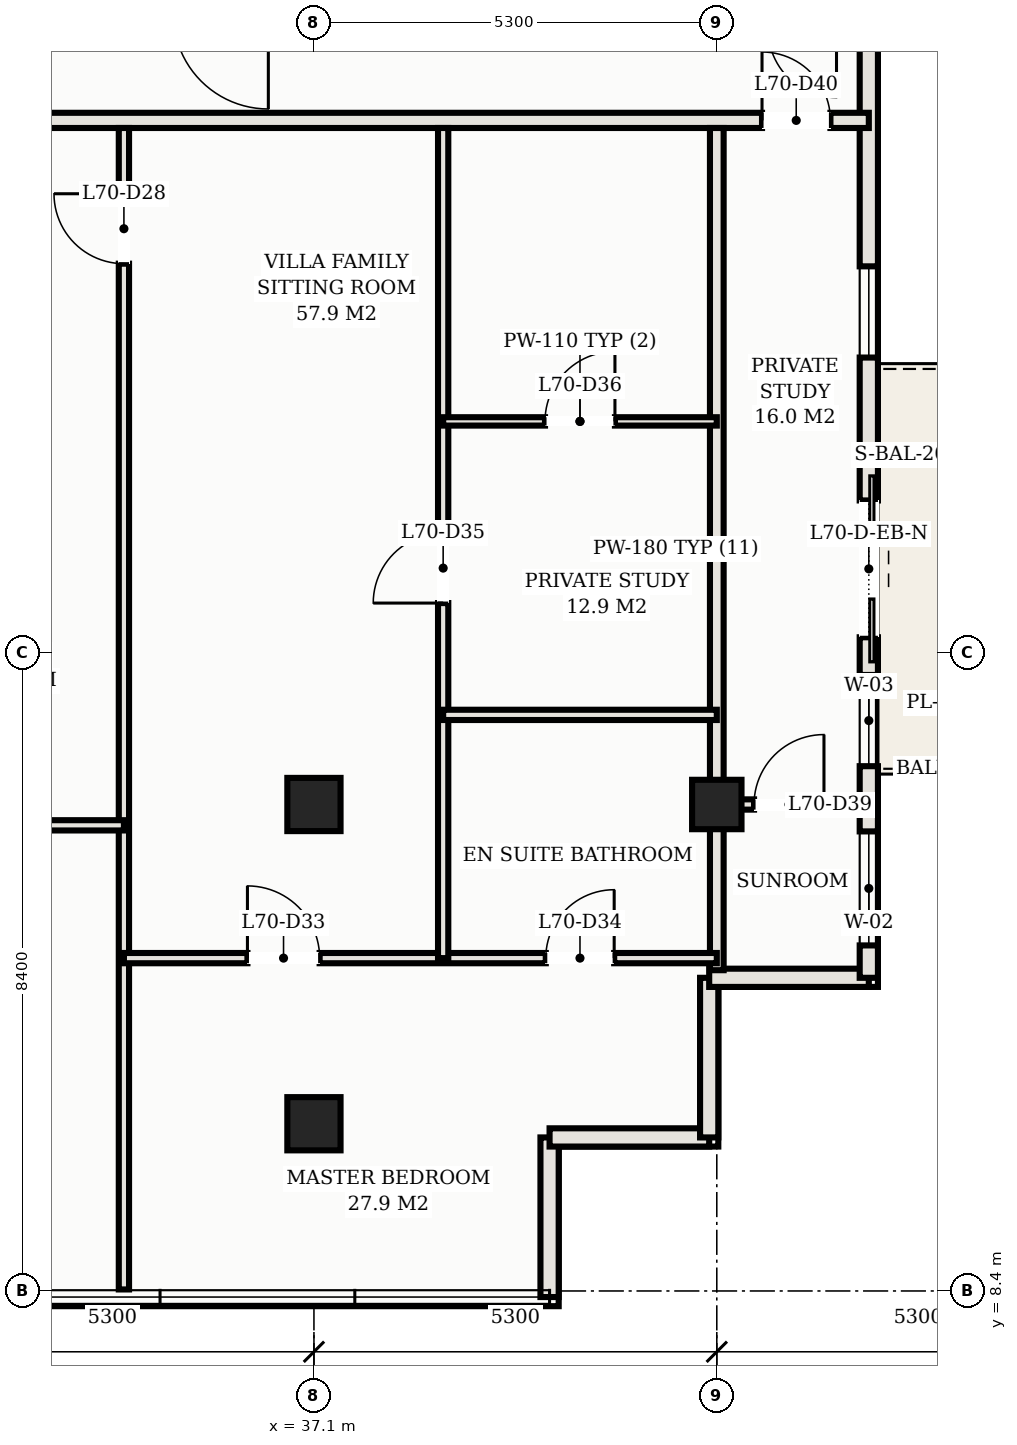
"""IFC4 building model, lengths in metres.
Left out: names, types, materials, properties, quantities, classifications, styles, units other than length and angle.
Written with IfcOpenShell. Run it as: python <this file> out.ifc"""

import sys

from ifc_helpers import new_model, si_unit, direction, frame, frame_2d, origin, origin_2d, place, context, subcontext, project, spatial, rectangle, hollow_rectangle, extrude, element, fill, save


model = new_model("IFC4")
c1 = context("Model", 3, precision=1e-05, world=origin(), true_north=direction((0.0, 1.0)))
c2 = subcontext(c1, "Body", "Model", "MODEL_VIEW")
j1 = project(units=[si_unit("LENGTHUNIT", "METRE"), si_unit("PLANEANGLEUNIT", "RADIAN")], contexts=[c1])
p1 = place(None, origin())
s1 = spatial("IfcSite", under=j1, at=p1, CompositionType="ELEMENT")
p2 = place(p1, origin())
s2 = spatial("IfcBuilding", under=s1, at=p2, CompositionType="ELEMENT")
p3 = place(p2, frame((0.0, 0.0, 252.8)))
s3 = spatial("IfcBuildingStorey", under=s2, at=p3, CompositionType="ELEMENT", Elevation=252.8)
for number, where, z_axis, x_axis in (
    (1, (37.1, 14.8, 0.0), (0.0, 0.0, 1.0), (1.0, 0.0, 0.0)),
    (2, (37.1, 10.6, 0.0), (0.0, 0.0, 1.0), (1.0, 0.0, 0.0)),
):
    element("IfcColumn", number, at=place(p3, frame(where, z_axis=z_axis, x_axis=x_axis)), inside=s3, PredefinedType="COLUMN", context=c2, shape_type="SweptSolid", body=[
        extrude(hollow_rectangle(XDim=0.7, YDim=0.7, WallThickness=0.025, at=origin_2d()), origin(), (0.0, 0.0, 1.0), 3.3),
    ])
p4 = place(p3, frame((42.4, 14.8, 0.0), z_axis=(0.0, 0.0, 1.0), x_axis=(1.0, 0.0, 0.0)))
e3 = element("IfcColumn", 3, at=p4, inside=s3, PredefinedType="COLUMN", context=c2, shape_type="SweptSolid", body=[
    extrude(hollow_rectangle(XDim=0.65, YDim=0.65, WallThickness=0.022, at=origin_2d()), origin(), (0.0, 0.0, 1.0), 3.3),
])
p5 = place(p3, frame((40.2, 8.32, 0.0), z_axis=(0.0, 0.0, 1.0), x_axis=(0.0, 1.0, 0.0)))
e4 = element("IfcWall", 4, at=p5, inside=s3, PredefinedType="SOLIDWALL", context=c2, shape_type="SweptSolid", body=[
    extrude(rectangle(XDim=2.1, YDim=0.24, at=frame_2d((1.05, 0.0))), origin(), (0.0, 0.0, 1.0), 3.11),
])
for number, where, z_axis, x_axis in (
    (5, (40.2, 10.42, 0.0), (0.0, 0.0, 1.0), (1.0, 0.0, 0.0)),
    (6, (42.3, 10.42, 0.0), (0.0, 0.0, 1.0), (0.0, 1.0, 0.0)),
):
    element("IfcWall", number, at=place(p3, frame(where, z_axis=z_axis, x_axis=x_axis)), inside=s3, PredefinedType="SOLIDWALL", context=c2, shape_type="SweptSolid", body=[
        extrude(rectangle(XDim=2.1, YDim=0.24, at=frame_2d((1.05, 0.0))), origin(), (0.0, 0.0, 1.0), 3.11),
    ])
p6 = place(p3, frame((42.3, 12.52, 0.0), z_axis=(0.0, 0.0, 1.0), x_axis=(1.0, 0.0, 0.0)))
e7 = element("IfcWall", 7, at=p6, inside=s3, PredefinedType="SOLIDWALL", context=c2, shape_type="SweptSolid", body=[
    extrude(rectangle(XDim=2.1, YDim=0.24, at=frame_2d((1.05, 0.0))), origin(), (0.0, 0.0, 1.0), 3.11),
])
p7 = place(p3, frame((44.4, 12.52, 0.0), z_axis=(0.0, 0.0, 1.0), x_axis=(0.0, 1.0, 0.0)))
e8 = element("IfcWall", 8, at=p7, inside=s3, PredefinedType="SOLIDWALL", context=c2, shape_type="SweptSolid", body=[
    extrude(rectangle(XDim=26.01, YDim=0.24, at=frame_2d((13.005, 0.0))), origin(), (0.0, 0.0, 1.0), 3.11),
])
p8 = place(p7, frame((4.48, 0.0, 0.0)))
e9 = element("IfcOpeningElement", 9, at=p8, cuts=e8, PredefinedType="OPENING", context=c2, shape_type="SweptSolid", body=[
    extrude(rectangle(XDim=1.8, YDim=2.2, at=frame_2d((0.9, 1.1))), frame((0.0, 0.13, 0.0), z_axis=(0.0, -1.0, 0.0), x_axis=(1.0, 0.0, 0.0)), (0.0, 0.0, 1.0), 0.26),
])
p9 = place(p7, frame((0.426, 0.0, 0.75)))
e10 = element("IfcOpeningElement", 10, at=p9, cuts=e8, PredefinedType="OPENING", context=c2, shape_type="SweptSolid", body=[
    extrude(rectangle(XDim=1.5, YDim=1.6, at=frame_2d((0.75, 0.8))), frame((0.0, 0.13, 0.0), z_axis=(0.0, -1.0, 0.0), x_axis=(1.0, 0.0, 0.0)), (0.0, 0.0, 1.0), 0.26),
])
p10 = place(p7, frame((2.784, 0.0, 0.75)))
e11 = element("IfcOpeningElement", 11, at=p10, cuts=e8, PredefinedType="OPENING", context=c2, shape_type="SweptSolid", body=[
    extrude(rectangle(XDim=1.2, YDim=1.5, at=frame_2d((0.6, 0.75))), frame((0.0, 0.13, 0.0), z_axis=(0.0, -1.0, 0.0), x_axis=(1.0, 0.0, 0.0)), (0.0, 0.0, 1.0), 0.26),
])
p11 = place(p7, frame((8.16, 0.0, 0.75)))
e12 = element("IfcOpeningElement", 12, at=p11, cuts=e8, PredefinedType="OPENING", context=c2, shape_type="SweptSolid", body=[
    extrude(rectangle(XDim=1.2, YDim=1.5, at=frame_2d((0.6, 0.75))), frame((0.0, 0.13, 0.0), z_axis=(0.0, -1.0, 0.0), x_axis=(1.0, 0.0, 0.0)), (0.0, 0.0, 1.0), 0.26),
])
p12 = place(p7, frame((16.296, 0.0, 0.75)))
e13 = element("IfcOpeningElement", 13, at=p12, cuts=e8, PredefinedType="OPENING", context=c2, shape_type="SweptSolid", body=[
    extrude(rectangle(XDim=1.2, YDim=1.5, at=frame_2d((0.6, 0.75))), frame((0.0, 0.13, 0.0), z_axis=(0.0, -1.0, 0.0), x_axis=(1.0, 0.0, 0.0)), (0.0, 0.0, 1.0), 0.26),
])
p13 = place(p7, frame((23.009, 0.0, 0.75)))
e14 = element("IfcOpeningElement", 14, at=p13, cuts=e8, PredefinedType="OPENING", context=c2, shape_type="SweptSolid", body=[
    extrude(rectangle(XDim=1.2, YDim=1.5, at=frame_2d((0.6, 0.75))), frame((0.0, 0.13, 0.0), z_axis=(0.0, -1.0, 0.0), x_axis=(1.0, 0.0, 0.0)), (0.0, 0.0, 1.0), 0.26),
])
p14 = place(p3, frame((8.6, 23.8, 0.0), z_axis=(0.0, 0.0, 1.0), x_axis=(1.0, 0.0, 0.0)))
e15 = element("IfcWall", 15, at=p14, inside=s3, PredefinedType="PARTITIONING", context=c2, shape_type="SweptSolid", body=[
    extrude(rectangle(XDim=35.8, YDim=0.2, at=frame_2d((17.9, 0.0))), origin(), (0.0, 0.0, 1.0), 2.45),
])
p15 = place(p14, frame((2.75, 0.0, 0.0)))
e16 = element("IfcOpeningElement", 16, at=p15, cuts=e15, PredefinedType="OPENING", context=c2, shape_type="SweptSolid", body=[
    extrude(rectangle(XDim=1.1, YDim=2.25, at=frame_2d((0.55, 1.125))), frame((0.0, 0.11, 0.0), z_axis=(0.0, -1.0, 0.0), x_axis=(1.0, 0.0, 0.0)), (0.0, 0.0, 1.0), 0.22),
])
p16 = place(p14, frame((18.85, 0.0, 0.0)))
e17 = element("IfcOpeningElement", 17, at=p16, cuts=e15, PredefinedType="OPENING", context=c2, shape_type="SweptSolid", body=[
    extrude(rectangle(XDim=1.1, YDim=2.25, at=frame_2d((0.55, 1.125))), frame((0.0, 0.11, 0.0), z_axis=(0.0, -1.0, 0.0), x_axis=(1.0, 0.0, 0.0)), (0.0, 0.0, 1.0), 0.22),
])
p17 = place(p14, frame((0.505, 0.0, 0.0)))
e18 = element("IfcOpeningElement", 18, at=p17, cuts=e15, PredefinedType="OPENING", context=c2, shape_type="SweptSolid", body=[
    extrude(rectangle(XDim=0.9, YDim=2.15, at=frame_2d((0.45, 1.075))), frame((0.0, 0.11, 0.0), z_axis=(0.0, -1.0, 0.0), x_axis=(1.0, 0.0, 0.0)), (0.0, 0.0, 1.0), 0.22),
])
p18 = place(p14, frame((34.395, 0.0, 0.0)))
e19 = element("IfcOpeningElement", 19, at=p18, cuts=e15, PredefinedType="OPENING", context=c2, shape_type="SweptSolid", body=[
    extrude(rectangle(XDim=0.9, YDim=2.15, at=frame_2d((0.45, 1.075))), frame((0.0, 0.11, 0.0), z_axis=(0.0, -1.0, 0.0), x_axis=(1.0, 0.0, 0.0)), (0.0, 0.0, 1.0), 0.22),
])
p19 = place(p3, frame((42.4, 12.62, 0.0), z_axis=(0.0, 0.0, 1.0), x_axis=(0.0, 1.0, 0.0)))
e20 = element("IfcWall", 20, at=p19, inside=s3, PredefinedType="PARTITIONING", context=c2, shape_type="SweptSolid", body=[
    extrude(rectangle(XDim=11.08, YDim=0.18, at=frame_2d((5.54, 0.0))), origin(), (0.0, 0.0, 1.0), 2.45),
])
p20 = place(p3, frame((34.6, 8.42, 0.0), z_axis=(0.0, 0.0, 1.0), x_axis=(0.0, 1.0, 0.0)))
e21 = element("IfcWall", 21, at=p20, inside=s3, PredefinedType="PARTITIONING", context=c2, shape_type="SweptSolid", body=[
    extrude(rectangle(XDim=15.28, YDim=0.135, at=frame_2d((7.64, 0.0))), origin(), (0.0, 0.0, 1.0), 2.45),
])
p21 = place(p20, frame((13.495, 0.0, 0.0)))
e22 = element("IfcOpeningElement", 22, at=p21, cuts=e21, PredefinedType="OPENING", context=c2, shape_type="SweptSolid", body=[
    extrude(rectangle(XDim=0.92, YDim=2.15, at=frame_2d((0.46, 1.075))), frame((0.0, 0.078, 0.0), z_axis=(0.0, -1.0, 0.0), x_axis=(1.0, 0.0, 0.0)), (0.0, 0.0, 1.0), 0.155),
])
p22 = place(p3, frame((26.5, 14.526, 0.0), z_axis=(0.0, 0.0, 1.0), x_axis=(1.0, 0.0, 0.0)))
e23 = element("IfcWall", 23, at=p22, inside=s3, PredefinedType="PARTITIONING", context=c2, shape_type="SweptSolid", body=[
    extrude(rectangle(XDim=8.1, YDim=0.135, at=frame_2d((4.05, 0.0))), origin(), (0.0, 0.0, 1.0), 2.45),
])
p23 = place(p22, frame((0.815, 0.0, 0.0)))
e24 = element("IfcOpeningElement", 24, at=p23, cuts=e23, PredefinedType="OPENING", context=c2, shape_type="SweptSolid", body=[
    extrude(rectangle(XDim=0.92, YDim=2.15, at=frame_2d((0.46, 1.075))), frame((0.0, 0.078, 0.0), z_axis=(0.0, -1.0, 0.0), x_axis=(1.0, 0.0, 0.0)), (0.0, 0.0, 1.0), 0.155),
])
p24 = place(p3, frame((34.6, 12.779, 0.0), z_axis=(0.0, 0.0, 1.0), x_axis=(1.0, 0.0, 0.0)))
e25 = element("IfcWall", 25, at=p24, inside=s3, PredefinedType="PARTITIONING", context=c2, shape_type="SweptSolid", body=[
    extrude(rectangle(XDim=7.8, YDim=0.135, at=frame_2d((3.9, 0.0))), origin(), (0.0, 0.0, 1.0), 2.45),
])
p25 = place(p24, frame((1.625, 0.0, 0.0)))
e26 = element("IfcOpeningElement", 26, at=p25, cuts=e25, PredefinedType="OPENING", context=c2, shape_type="SweptSolid", body=[
    extrude(rectangle(XDim=0.95, YDim=2.15, at=frame_2d((0.475, 1.075))), frame((0.0, 0.078, 0.0), z_axis=(0.0, -1.0, 0.0), x_axis=(1.0, 0.0, 0.0)), (0.0, 0.0, 1.0), 0.155),
])
p26 = place(p24, frame((5.55, 0.0, 0.0)))
e27 = element("IfcOpeningElement", 27, at=p26, cuts=e25, PredefinedType="OPENING", context=c2, shape_type="SweptSolid", body=[
    extrude(rectangle(XDim=0.9, YDim=2.15, at=frame_2d((0.45, 1.075))), frame((0.0, 0.078, 0.0), z_axis=(0.0, -1.0, 0.0), x_axis=(1.0, 0.0, 0.0)), (0.0, 0.0, 1.0), 0.155),
])
p27 = place(p3, frame((38.8, 12.779, 0.0), z_axis=(0.0, 0.0, 1.0), x_axis=(0.0, 1.0, 0.0)))
e28 = element("IfcWall", 28, at=p27, inside=s3, PredefinedType="PARTITIONING", context=c2, shape_type="SweptSolid", body=[
    extrude(rectangle(XDim=10.921, YDim=0.135, at=frame_2d((5.46, 0.0))), origin(), (0.0, 0.0, 1.0), 2.45),
])
p28 = place(p27, frame((4.671, 0.0, 0.0)))
e29 = element("IfcOpeningElement", 29, at=p28, cuts=e28, PredefinedType="OPENING", context=c2, shape_type="SweptSolid", body=[
    extrude(rectangle(XDim=0.92, YDim=2.15, at=frame_2d((0.46, 1.075))), frame((0.0, 0.078, 0.0), z_axis=(0.0, -1.0, 0.0), x_axis=(1.0, 0.0, 0.0)), (0.0, 0.0, 1.0), 0.155),
])
p29 = place(p3, frame((38.8, 15.979, 0.0), z_axis=(0.0, 0.0, 1.0), x_axis=(1.0, 0.0, 0.0)))
e30 = element("IfcWall", 30, at=p29, inside=s3, PredefinedType="PARTITIONING", context=c2, shape_type="SweptSolid", body=[
    extrude(rectangle(XDim=3.6, YDim=0.135, at=frame_2d((1.8, 0.0))), origin(), (0.0, 0.0, 1.0), 2.45),
])
p30 = place(p3, frame((38.8, 19.84, 0.0), z_axis=(0.0, 0.0, 1.0), x_axis=(1.0, 0.0, 0.0)))
e31 = element("IfcWall", 31, at=p30, inside=s3, PredefinedType="MOVABLE", context=c2, shape_type="SweptSolid", body=[
    extrude(rectangle(XDim=3.6, YDim=0.11, at=frame_2d((1.8, 0.0))), origin(), (0.0, 0.0, 1.0), 2.45),
])
p31 = place(p30, frame((1.34, 0.0, 0.0)))
e32 = element("IfcOpeningElement", 32, at=p31, cuts=e31, PredefinedType="OPENING", context=c2, shape_type="SweptSolid", body=[
    extrude(rectangle(XDim=0.92, YDim=2.15, at=frame_2d((0.46, 1.075))), frame((0.0, 0.065, 0.0), z_axis=(0.0, -1.0, 0.0), x_axis=(1.0, 0.0, 0.0)), (0.0, 0.0, 1.0), 0.13),
])
p32 = place(p3, frame((42.4, 14.8, 0.0), z_axis=(0.0, 0.0, 1.0), x_axis=(1.0, 0.0, 0.0)))
e33 = element("IfcWall", 33, at=p32, inside=s3, PredefinedType="PARTITIONING", context=c2, shape_type="SweptSolid", body=[
    extrude(rectangle(XDim=1.9, YDim=0.135, at=frame_2d((0.95, 0.0))), origin(), (0.0, 0.0, 1.0), 2.45),
])
p33 = place(p32, frame((0.49, 0.0, 0.0)))
e34 = element("IfcOpeningElement", 34, at=p33, cuts=e33, PredefinedType="OPENING", context=c2, shape_type="SweptSolid", body=[
    extrude(rectangle(XDim=0.92, YDim=2.15, at=frame_2d((0.46, 1.075))), frame((0.0, 0.078, 0.0), z_axis=(0.0, -1.0, 0.0), x_axis=(1.0, 0.0, 0.0)), (0.0, 0.0, 1.0), 0.155),
])
p34 = place(p8, frame((1.8, 0.0, 0.0), z_axis=(0.0, 0.0, 1.0), x_axis=(-1.0, 0.0, 0.0)))
e35 = element("IfcDoor", 35, at=p34, inside=s3, OperationType="DOUBLE_DOOR_SLIDING", PredefinedType="DOOR", context=c2, shape_type="SweptSolid", body=[
    extrude(rectangle(XDim=1.8, YDim=2.2, at=frame_2d((0.9, 1.1))), frame((0.0, 0.025, 0.0), z_axis=(0.0, -1.0, 0.0), x_axis=(1.0, 0.0, 0.0)), (0.0, 0.0, 1.0), 0.05),
])
fill(e9, e35)
p35 = place(p9, origin())
e36 = element("IfcWindow", 36, at=p35, inside=s3, PartitioningType="SINGLE_PANEL", PredefinedType="WINDOW", context=c2, shape_type="SweptSolid", body=[
    extrude(rectangle(XDim=1.5, YDim=1.6, at=frame_2d((0.75, 0.8))), frame((0.0, 0.03, 0.0), z_axis=(0.0, -1.0, 0.0), x_axis=(1.0, 0.0, 0.0)), (0.0, 0.0, 1.0), 0.06),
])
fill(e10, e36)
p36 = place(p21, origin())
e37 = element("IfcDoor", 37, at=p36, inside=s3, OperationType="SINGLE_SWING_RIGHT", PredefinedType="DOOR", context=c2, shape_type="SweptSolid", body=[
    extrude(rectangle(XDim=0.92, YDim=2.15, at=frame_2d((0.46, 1.075))), frame((0.0, 0.025, 0.0), z_axis=(0.0, -1.0, 0.0), x_axis=(1.0, 0.0, 0.0)), (0.0, 0.0, 1.0), 0.05),
])
fill(e22, e37)
p37 = place(p25, origin())
e38 = element("IfcDoor", 38, at=p37, inside=s3, OperationType="SINGLE_SWING_LEFT", PredefinedType="DOOR", context=c2, shape_type="SweptSolid", body=[
    extrude(rectangle(XDim=0.95, YDim=2.15, at=frame_2d((0.475, 1.075))), frame((0.0, 0.025, 0.0), z_axis=(0.0, -1.0, 0.0), x_axis=(1.0, 0.0, 0.0)), (0.0, 0.0, 1.0), 0.05),
])
fill(e26, e38)
p38 = place(p26, origin())
e39 = element("IfcDoor", 39, at=p38, inside=s3, OperationType="SINGLE_SWING_RIGHT", PredefinedType="DOOR", context=c2, shape_type="SweptSolid", body=[
    extrude(rectangle(XDim=0.9, YDim=2.15, at=frame_2d((0.45, 1.075))), frame((0.0, 0.025, 0.0), z_axis=(0.0, -1.0, 0.0), x_axis=(1.0, 0.0, 0.0)), (0.0, 0.0, 1.0), 0.05),
])
fill(e27, e39)
p39 = place(p28, origin())
e40 = element("IfcDoor", 40, at=p39, inside=s3, OperationType="SINGLE_SWING_LEFT", PredefinedType="DOOR", context=c2, shape_type="SweptSolid", body=[
    extrude(rectangle(XDim=0.92, YDim=2.15, at=frame_2d((0.46, 1.075))), frame((0.0, 0.025, 0.0), z_axis=(0.0, -1.0, 0.0), x_axis=(1.0, 0.0, 0.0)), (0.0, 0.0, 1.0), 0.05),
])
fill(e29, e40)
p40 = place(p31, origin())
e41 = element("IfcDoor", 41, at=p40, inside=s3, OperationType="SINGLE_SWING_RIGHT", PredefinedType="DOOR", context=c2, shape_type="SweptSolid", body=[
    extrude(rectangle(XDim=0.92, YDim=2.15, at=frame_2d((0.46, 1.075))), frame((0.0, 0.025, 0.0), z_axis=(0.0, -1.0, 0.0), x_axis=(1.0, 0.0, 0.0)), (0.0, 0.0, 1.0), 0.05),
])
fill(e32, e41)
p41 = place(p33, origin())
e42 = element("IfcDoor", 42, at=p41, inside=s3, OperationType="SINGLE_SWING_RIGHT", PredefinedType="DOOR", context=c2, shape_type="SweptSolid", body=[
    extrude(rectangle(XDim=0.92, YDim=2.15, at=frame_2d((0.46, 1.075))), frame((0.0, 0.025, 0.0), z_axis=(0.0, -1.0, 0.0), x_axis=(1.0, 0.0, 0.0)), (0.0, 0.0, 1.0), 0.05),
])
fill(e34, e42)
p42 = place(p18, origin())
e43 = element("IfcDoor", 43, at=p42, inside=s3, OperationType="SINGLE_SWING_LEFT", PredefinedType="DOOR", context=c2, shape_type="SweptSolid", body=[
    extrude(rectangle(XDim=0.9, YDim=2.15, at=frame_2d((0.45, 1.075))), frame((0.0, 0.025, 0.0), z_axis=(0.0, -1.0, 0.0), x_axis=(1.0, 0.0, 0.0)), (0.0, 0.0, 1.0), 0.05),
])
fill(e19, e43)
p43 = place(p10, origin())
e44 = element("IfcWindow", 44, at=p43, inside=s3, PartitioningType="SINGLE_PANEL", PredefinedType="WINDOW", context=c2, shape_type="SweptSolid", body=[
    extrude(rectangle(XDim=1.2, YDim=1.5, at=frame_2d((0.6, 0.75))), frame((0.0, 0.03, 0.0), z_axis=(0.0, -1.0, 0.0), x_axis=(1.0, 0.0, 0.0)), (0.0, 0.0, 1.0), 0.06),
])
fill(e11, e44)
p44 = place(p11, origin())
e45 = element("IfcWindow", 45, at=p44, inside=s3, PartitioningType="SINGLE_PANEL", PredefinedType="WINDOW", context=c2, shape_type="SweptSolid", body=[
    extrude(rectangle(XDim=1.2, YDim=1.5, at=frame_2d((0.6, 0.75))), frame((0.0, 0.03, 0.0), z_axis=(0.0, -1.0, 0.0), x_axis=(1.0, 0.0, 0.0)), (0.0, 0.0, 1.0), 0.06),
])
fill(e12, e45)
save(model, sys.argv[1])
